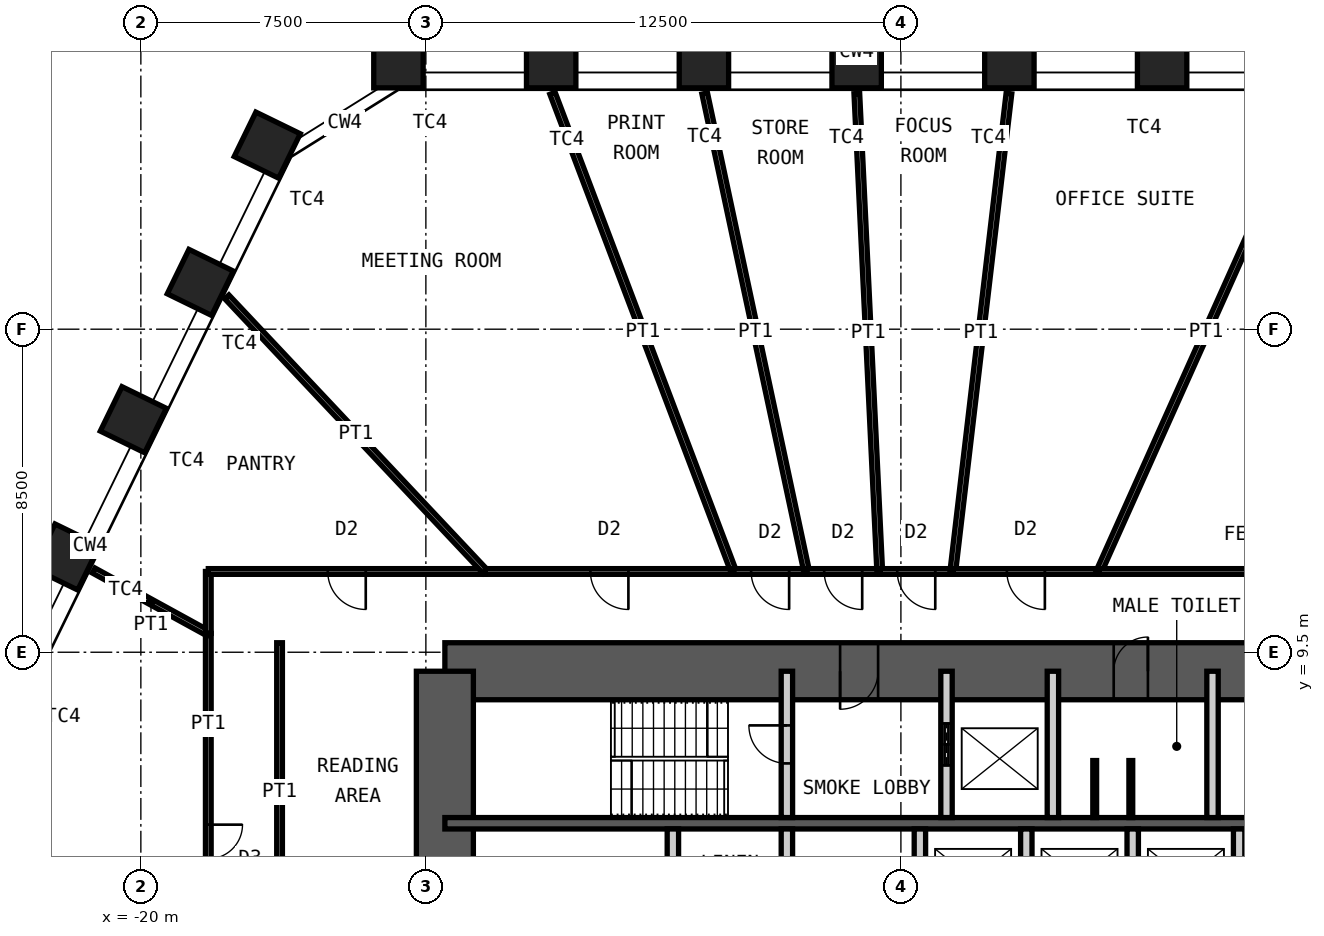
"""IFC4 building model, lengths in metres.
Left out: names, types, materials, properties, quantities, classifications, styles, units other than length and angle.
Written with IfcOpenShell. Run it as: python <this file> out.ifc"""

import sys

from ifc_helpers import new_model, si_unit, direction, frame, frame_2d, origin, origin_2d, place, context, subcontext, project, spatial, rectangle, hollow_rectangle, extrude, element, fill, save


model = new_model("IFC4")
c1 = context("Model", 3, precision=1e-05, world=origin(), true_north=direction((0.0, 1.0)))
c2 = subcontext(c1, "Body", "Model", "MODEL_VIEW")
j1 = project(units=[si_unit("LENGTHUNIT", "METRE"), si_unit("PLANEANGLEUNIT", "RADIAN")], contexts=[c1])
p1 = place(None, origin())
s1 = spatial("IfcSite", under=j1, at=p1, CompositionType="ELEMENT")
p2 = place(p1, origin())
s2 = spatial("IfcBuilding", under=s1, at=p2, CompositionType="ELEMENT")
p3 = place(p2, frame((0.0, 0.0, 145.0)))
s3 = spatial("IfcBuildingStorey", under=s2, at=p3, CompositionType="ELEMENT", Elevation=145.0)
for number, where, z_axis, x_axis in (
    (1, (-13.222, 25.0, 0.0), (0.0, 0.0, 1.0), (-1.0, 0.0, 0.0)),
    (2, (-9.203, 25.0, 0.0), (0.0, 0.0, 1.0), (-1.0, 0.0, 0.0)),
    (3, (-5.184, 25.0, 0.0), (0.0, 0.0, 1.0), (-1.0, 0.0, 0.0)),
    (4, (-1.165, 25.0, 0.0), (0.0, 0.0, 1.0), (-1.0, 0.0, 0.0)),
    (5, (2.854, 25.0, 0.0), (0.0, 0.0, 1.0), (-1.0, 0.0, 0.0)),
    (6, (6.874, 25.0, 0.0), (0.0, 0.0, 1.0), (-1.0, 0.0, 0.0)),
    (7, (-21.959, 12.006, 0.0), (0.0, 0.0, 1.0), (-0.438, -0.899, 0.0)),
    (8, (-20.198, 15.618, 0.0), (0.0, 0.0, 1.0), (-0.438, -0.899, 0.0)),
    (9, (-18.436, 19.23, 0.0), (0.0, 0.0, 1.0), (-0.438, -0.899, 0.0)),
    (10, (-16.674, 22.843, 0.0), (0.0, 0.0, 1.0), (-0.438, -0.899, 0.0)),
):
    element("IfcColumn", number, at=place(p3, frame(where, z_axis=z_axis, x_axis=x_axis)), inside=s3, PredefinedType="COLUMN", context=c2, shape_type="SweptSolid", body=[
        extrude(hollow_rectangle(XDim=1.3, YDim=1.3, WallThickness=0.1, at=origin_2d()), origin(), (0.0, 0.0, 1.0), 4.2),
    ])
p4 = place(p3, frame((-12.0, 9.0, 0.0), z_axis=(0.0, 0.0, 1.0), x_axis=(1.0, 0.0, 0.0)))
e11 = element("IfcWall", 11, at=p4, inside=s3, PredefinedType="SHEAR", context=c2, shape_type="SweptSolid", body=[
    extrude(rectangle(XDim=24.0, YDim=1.5, at=frame_2d((12.0, 0.0))), origin(), (0.0, 0.0, 1.0), 4.2),
])
p5 = place(p4, frame((10.4, 0.0, 0.0)))
e12 = element("IfcOpeningElement", 12, at=p5, cuts=e11, PredefinedType="OPENING", context=c2, shape_type="SweptSolid", body=[
    extrude(rectangle(XDim=1.0, YDim=2.1, at=frame_2d((0.5, 1.05))), frame((0.0, 0.76, 0.0), z_axis=(0.0, -1.0, 0.0), x_axis=(1.0, 0.0, 0.0)), (0.0, 0.0, 1.0), 1.52),
])
p6 = place(p4, frame((17.6, 0.0, 0.0)))
e13 = element("IfcOpeningElement", 13, at=p6, cuts=e11, PredefinedType="OPENING", context=c2, shape_type="SweptSolid", body=[
    extrude(rectangle(XDim=0.9, YDim=2.1, at=frame_2d((0.45, 1.05))), frame((0.0, 0.76, 0.0), z_axis=(0.0, -1.0, 0.0), x_axis=(1.0, 0.0, 0.0)), (0.0, 0.0, 1.0), 1.52),
])
p7 = place(p4, frame((21.9, 0.0, 0.0)))
e14 = element("IfcOpeningElement", 14, at=p7, cuts=e11, PredefinedType="OPENING", context=c2, shape_type="SweptSolid", body=[
    extrude(rectangle(XDim=0.9, YDim=2.1, at=frame_2d((0.45, 1.05))), frame((0.0, 0.76, 0.0), z_axis=(0.0, -1.0, 0.0), x_axis=(1.0, 0.0, 0.0)), (0.0, 0.0, 1.0), 1.52),
])
p8 = place(p3, frame((-12.0, -9.0, 0.0), z_axis=(0.0, 0.0, 1.0), x_axis=(0.0, 1.0, 0.0)))
e15 = element("IfcWall", 15, at=p8, inside=s3, PredefinedType="SHEAR", context=c2, shape_type="SweptSolid", body=[
    extrude(rectangle(XDim=18.0, YDim=1.5, at=frame_2d((9.0, 0.0))), origin(), (0.0, 0.0, 1.0), 4.2),
])
p9 = place(p8, frame((8.1, 0.0, 0.0)))
e16 = element("IfcOpeningElement", 16, at=p9, cuts=e15, PredefinedType="OPENING", context=c2, shape_type="SweptSolid", body=[
    extrude(rectangle(XDim=1.8, YDim=2.1, at=frame_2d((0.9, 1.05))), frame((0.0, 0.76, 0.0), z_axis=(0.0, -1.0, 0.0), x_axis=(1.0, 0.0, 0.0)), (0.0, 0.0, 1.0), 1.52),
])
p10 = place(p3, frame((-12.0, 5.0, 0.0), z_axis=(0.0, 0.0, 1.0), x_axis=(1.0, 0.0, 0.0)))
e17 = element("IfcWall", 17, at=p10, inside=s3, PredefinedType="SHEAR", context=c2, shape_type="SweptSolid", body=[
    extrude(rectangle(XDim=24.0, YDim=0.3, at=frame_2d((12.0, 0.0))), origin(), (0.0, 0.0, 1.0), 4.2),
])
p11 = place(p3, frame((-3.0, 5.15, 0.0), z_axis=(0.0, 0.0, 1.0), x_axis=(0.0, 1.0, 0.0)))
e18 = element("IfcWall", 18, at=p11, inside=s3, PredefinedType="PARTITIONING", context=c2, shape_type="SweptSolid", body=[
    extrude(rectangle(XDim=3.85, YDim=0.3, at=frame_2d((1.925, 0.0))), origin(), (0.0, 0.0, 1.0), 3.98),
])
p12 = place(p11, frame((1.425, 0.0, 0.0)))
e19 = element("IfcOpeningElement", 19, at=p12, cuts=e18, PredefinedType="OPENING", context=c2, shape_type="SweptSolid", body=[
    extrude(rectangle(XDim=1.0, YDim=2.1, at=frame_2d((0.5, 1.05))), frame((0.0, 0.16, 0.0), z_axis=(0.0, -1.0, 0.0), x_axis=(1.0, 0.0, 0.0)), (0.0, 0.0, 1.0), 0.32),
])
p13 = place(p3, frame((1.2, 5.15, 0.0), z_axis=(0.0, 0.0, 1.0), x_axis=(0.0, 1.0, 0.0)))
e20 = element("IfcWall", 20, at=p13, inside=s3, PredefinedType="PARTITIONING", context=c2, shape_type="SweptSolid", body=[
    extrude(rectangle(XDim=3.85, YDim=0.3, at=frame_2d((1.925, 0.0))), origin(), (0.0, 0.0, 1.0), 3.98),
])
p14 = place(p13, frame((1.375, 0.0, 0.0)))
e21 = element("IfcOpeningElement", 21, at=p14, cuts=e20, PredefinedType="OPENING", context=c2, shape_type="SweptSolid", body=[
    extrude(rectangle(XDim=1.1, YDim=2.4, at=frame_2d((0.55, 1.2))), frame((0.0, 0.16, 0.0), z_axis=(0.0, -1.0, 0.0), x_axis=(1.0, 0.0, 0.0)), (0.0, 0.0, 1.0), 0.32),
])
for number, where, z_axis, x_axis in (
    (22, (4.0, 5.15, 0.0), (0.0, 0.0, 1.0), (0.0, 1.0, 0.0)),
    (23, (8.2, 5.15, 0.0), (0.0, 0.0, 1.0), (0.0, 1.0, 0.0)),
):
    element("IfcWall", number, at=place(p3, frame(where, z_axis=z_axis, x_axis=x_axis)), inside=s3, PredefinedType="PARTITIONING", context=c2, shape_type="SweptSolid", body=[
        extrude(rectangle(XDim=3.85, YDim=0.3, at=frame_2d((1.925, 0.0))), origin(), (0.0, 0.0, 1.0), 3.98),
    ])
for number, where, z_axis, x_axis in (
    (24, (-6.0, 2.2, 0.0), (0.0, 0.0, 1.0), (0.0, 1.0, 0.0)),
    (25, (-3.0, 2.2, 0.0), (0.0, 0.0, 1.0), (0.0, 1.0, 0.0)),
    (26, (0.5, 2.2, 0.0), (0.0, 0.0, 1.0), (0.0, 1.0, 0.0)),
    (27, (3.3, 2.2, 0.0), (0.0, 0.0, 1.0), (0.0, 1.0, 0.0)),
    (28, (6.1, 2.2, 0.0), (0.0, 0.0, 1.0), (0.0, 1.0, 0.0)),
    (29, (8.9, 2.2, 0.0), (0.0, 0.0, 1.0), (0.0, 1.0, 0.0)),
):
    element("IfcWall", number, at=place(p3, frame(where, z_axis=z_axis, x_axis=x_axis)), inside=s3, PredefinedType="PARTITIONING", context=c2, shape_type="SweptSolid", body=[
        extrude(rectangle(XDim=2.65, YDim=0.3, at=frame_2d((1.325, 0.0))), origin(), (0.0, 0.0, 1.0), 3.98),
    ])
for number, where, z_axis, x_axis in (
    (30, (5.1, 5.15, 0.0), (0.0, 0.0, 1.0), (0.0, 1.0, 0.0)),
    (31, (6.05, 5.15, 0.0), (0.0, 0.0, 1.0), (0.0, 1.0, 0.0)),
):
    element("IfcWall", number, at=place(p3, frame(where, z_axis=z_axis, x_axis=x_axis)), inside=s3, PredefinedType="PARTITIONING", context=c2, shape_type="SweptSolid", body=[
        extrude(rectangle(XDim=1.5, YDim=0.1, at=frame_2d((0.75, 0.0))), origin(), (0.0, 0.0, 1.0), 2.1),
    ])
p15 = place(p3, frame((-18.225, -1.869, 0.0), z_axis=(0.0, 0.0, 1.0), x_axis=(0.0, 1.0, 0.0)))
e32 = element("IfcWall", 32, at=p15, inside=s3, PredefinedType="PARTITIONING", context=c2, shape_type="SweptSolid", body=[
    extrude(rectangle(XDim=11.865, YDim=0.15, at=frame_2d((5.932, 0.0))), origin(), (0.0, 0.0, 1.0), 4.03),
])
p16 = place(p15, frame((5.032, 0.0, 0.0)))
e33 = element("IfcOpeningElement", 33, at=p16, cuts=e32, PredefinedType="OPENING", context=c2, shape_type="SweptSolid", body=[
    extrude(rectangle(XDim=1.8, YDim=2.4, at=frame_2d((0.9, 1.2))), frame((0.0, 0.085, 0.0), z_axis=(0.0, -1.0, 0.0), x_axis=(1.0, 0.0, 0.0)), (0.0, 0.0, 1.0), 0.17),
])
p17 = place(p3, frame((-21.242, 11.651, 0.0), z_axis=(0.0, 0.0, 1.0), x_axis=(0.876768023831, -0.480913539409, 0.0)))
e34 = element("IfcWall", 34, at=p17, inside=s3, PredefinedType="PARTITIONING", context=c2, shape_type="SweptSolid", body=[
    extrude(rectangle(XDim=3.441, YDim=0.15, at=frame_2d((1.721, 0.0))), origin(), (0.0, 0.0, 1.0), 3.33),
])
p18 = place(p3, frame((-18.225, 9.996, 0.0), z_axis=(0.0, 0.0, 1.0), x_axis=(0.0, 1.0, 0.0)))
e35 = element("IfcWall", 35, at=p18, inside=s3, PredefinedType="PARTITIONING", context=c2, shape_type="SweptSolid", body=[
    extrude(rectangle(XDim=1.629, YDim=0.15, at=frame_2d((0.814, 0.0))), origin(), (0.0, 0.0, 1.0), 4.03),
])
p19 = place(p3, frame((-18.225, 11.625, 0.0), z_axis=(0.0, 0.0, 1.0), x_axis=(1.0, 0.0, 0.0)))
e36 = element("IfcWall", 36, at=p19, inside=s3, PredefinedType="PARTITIONING", context=c2, shape_type="SweptSolid", body=[
    extrude(rectangle(XDim=7.286, YDim=0.15, at=frame_2d((3.643, 0.0))), origin(), (0.0, 0.0, 1.0), 4.03),
])
p20 = place(p19, frame((3.143, 0.0, 0.0)))
e37 = element("IfcOpeningElement", 37, at=p20, cuts=e36, PredefinedType="OPENING", context=c2, shape_type="SweptSolid", body=[
    extrude(rectangle(XDim=1.0, YDim=2.4, at=frame_2d((0.5, 1.2))), frame((0.0, 0.085, 0.0), z_axis=(0.0, -1.0, 0.0), x_axis=(1.0, 0.0, 0.0)), (0.0, 0.0, 1.0), 0.17),
])
p21 = place(p3, frame((-17.738, 18.851, 0.0), z_axis=(0.0, 0.0, 1.0), x_axis=(0.685286406267, -0.728273672039, 0.0)))
e38 = element("IfcWall", 38, at=p21, inside=s3, PredefinedType="PARTITIONING", context=c2, shape_type="SweptSolid", body=[
    extrude(rectangle(XDim=9.922, YDim=0.15, at=frame_2d((4.961, 0.0))), origin(), (0.0, 0.0, 1.0), 3.33),
])
p22 = place(p3, frame((-10.939, 11.625, 0.0), z_axis=(0.0, 0.0, 1.0), x_axis=(1.0, 0.0, 0.0)))
e39 = element("IfcWall", 39, at=p22, inside=s3, PredefinedType="PARTITIONING", context=c2, shape_type="SweptSolid", body=[
    extrude(rectangle(XDim=6.536, YDim=0.15, at=frame_2d((3.268, 0.0))), origin(), (0.0, 0.0, 1.0), 4.03),
])
p23 = place(p22, frame((2.768, 0.0, 0.0)))
e40 = element("IfcOpeningElement", 40, at=p23, cuts=e39, PredefinedType="OPENING", context=c2, shape_type="SweptSolid", body=[
    extrude(rectangle(XDim=1.0, YDim=2.4, at=frame_2d((0.5, 1.2))), frame((0.0, 0.085, 0.0), z_axis=(0.0, -1.0, 0.0), x_axis=(1.0, 0.0, 0.0)), (0.0, 0.0, 1.0), 0.17),
])
p24 = place(p3, frame((-9.167, 24.207, 0.0), z_axis=(0.0, 0.0, 1.0), x_axis=(0.354156368181, -0.935186220427, 0.0)))
e41 = element("IfcWall", 41, at=p24, inside=s3, PredefinedType="PARTITIONING", context=c2, shape_type="SweptSolid", body=[
    extrude(rectangle(XDim=13.454, YDim=0.15, at=frame_2d((6.727, 0.0))), origin(), (0.0, 0.0, 1.0), 3.33),
])
p25 = place(p3, frame((-4.403, 11.625, 0.0), z_axis=(0.0, 0.0, 1.0), x_axis=(1.0, 0.0, 0.0)))
e42 = element("IfcWall", 42, at=p25, inside=s3, PredefinedType="PARTITIONING", context=c2, shape_type="SweptSolid", body=[
    extrude(rectangle(XDim=1.923, YDim=0.15, at=frame_2d((0.961, 0.0))), origin(), (0.0, 0.0, 1.0), 4.03),
])
p26 = place(p25, frame((0.461, 0.0, 0.0)))
e43 = element("IfcOpeningElement", 43, at=p26, cuts=e42, PredefinedType="OPENING", context=c2, shape_type="SweptSolid", body=[
    extrude(rectangle(XDim=1.0, YDim=2.4, at=frame_2d((0.5, 1.2))), frame((0.0, 0.085, 0.0), z_axis=(0.0, -1.0, 0.0), x_axis=(1.0, 0.0, 0.0)), (0.0, 0.0, 1.0), 0.17),
])
p27 = place(p3, frame((-5.163, 24.202, 0.0), z_axis=(0.0, 0.0, 1.0), x_axis=(0.208618861146, -0.977997019819, 0.0)))
e44 = element("IfcWall", 44, at=p27, inside=s3, PredefinedType="PARTITIONING", context=c2, shape_type="SweptSolid", body=[
    extrude(rectangle(XDim=12.86, YDim=0.15, at=frame_2d((6.43, 0.0))), origin(), (0.0, 0.0, 1.0), 3.33),
])
p28 = place(p3, frame((-2.48, 11.625, 0.0), z_axis=(0.0, 0.0, 1.0), x_axis=(1.0, 0.0, 0.0)))
e45 = element("IfcWall", 45, at=p28, inside=s3, PredefinedType="PARTITIONING", context=c2, shape_type="SweptSolid", body=[
    extrude(rectangle(XDim=1.923, YDim=0.15, at=frame_2d((0.961, 0.0))), origin(), (0.0, 0.0, 1.0), 4.03),
])
p29 = place(p28, frame((0.461, 0.0, 0.0)))
e46 = element("IfcOpeningElement", 46, at=p29, cuts=e45, PredefinedType="OPENING", context=c2, shape_type="SweptSolid", body=[
    extrude(rectangle(XDim=1.0, YDim=2.4, at=frame_2d((0.5, 1.2))), frame((0.0, 0.085, 0.0), z_axis=(0.0, -1.0, 0.0), x_axis=(1.0, 0.0, 0.0)), (0.0, 0.0, 1.0), 0.17),
])
p30 = place(p3, frame((-1.16, 24.2, 0.0), z_axis=(0.0, 0.0, 1.0), x_axis=(0.047859979164, -0.998854054602, 0.0)))
e47 = element("IfcWall", 47, at=p30, inside=s3, PredefinedType="PARTITIONING", context=c2, shape_type="SweptSolid", body=[
    extrude(rectangle(XDim=12.59, YDim=0.15, at=frame_2d((6.295, 0.0))), origin(), (0.0, 0.0, 1.0), 3.33),
])
p31 = place(p3, frame((-0.557, 11.625, 0.0), z_axis=(0.0, 0.0, 1.0), x_axis=(1.0, 0.0, 0.0)))
e48 = element("IfcWall", 48, at=p31, inside=s3, PredefinedType="PARTITIONING", context=c2, shape_type="SweptSolid", body=[
    extrude(rectangle(XDim=1.923, YDim=0.15, at=frame_2d((0.961, 0.0))), origin(), (0.0, 0.0, 1.0), 4.03),
])
p32 = place(p31, frame((0.461, 0.0, 0.0)))
e49 = element("IfcOpeningElement", 49, at=p32, cuts=e48, PredefinedType="OPENING", context=c2, shape_type="SweptSolid", body=[
    extrude(rectangle(XDim=1.0, YDim=2.4, at=frame_2d((0.5, 1.2))), frame((0.0, 0.085, 0.0), z_axis=(0.0, -1.0, 0.0), x_axis=(1.0, 0.0, 0.0)), (0.0, 0.0, 1.0), 0.17),
])
p33 = place(p3, frame((2.843, 24.201, 0.0), z_axis=(0.0, 0.0, 1.0), x_axis=(-0.116670084723, -0.993170726175, 0.0)))
e50 = element("IfcWall", 50, at=p33, inside=s3, PredefinedType="PARTITIONING", context=c2, shape_type="SweptSolid", body=[
    extrude(rectangle(XDim=12.662, YDim=0.15, at=frame_2d((6.331, 0.0))), origin(), (0.0, 0.0, 1.0), 3.33),
])
p34 = place(p3, frame((1.366, 11.625, 0.0), z_axis=(0.0, 0.0, 1.0), x_axis=(1.0, 0.0, 0.0)))
e51 = element("IfcWall", 51, at=p34, inside=s3, PredefinedType="PARTITIONING", context=c2, shape_type="SweptSolid", body=[
    extrude(rectangle(XDim=3.845, YDim=0.15, at=frame_2d((1.923, 0.0))), origin(), (0.0, 0.0, 1.0), 4.03),
])
p35 = place(p34, frame((1.423, 0.0, 0.0)))
e52 = element("IfcOpeningElement", 52, at=p35, cuts=e51, PredefinedType="OPENING", context=c2, shape_type="SweptSolid", body=[
    extrude(rectangle(XDim=1.0, YDim=2.4, at=frame_2d((0.5, 1.2))), frame((0.0, 0.085, 0.0), z_axis=(0.0, -1.0, 0.0), x_axis=(1.0, 0.0, 0.0)), (0.0, 0.0, 1.0), 0.17),
])
p36 = place(p3, frame((10.852, 24.209, 0.0), z_axis=(0.0, 0.0, 1.0), x_axis=(-0.40904878746, -0.912512514696, 0.0)))
e53 = element("IfcWall", 53, at=p36, inside=s3, PredefinedType="PARTITIONING", context=c2, shape_type="SweptSolid", body=[
    extrude(rectangle(XDim=13.79, YDim=0.15, at=frame_2d((6.895, 0.0))), origin(), (0.0, 0.0, 1.0), 2.93),
])
p37 = place(p3, frame((5.211, 11.625, 0.0), z_axis=(0.0, 0.0, 1.0), x_axis=(1.0, 0.0, 0.0)))
e54 = element("IfcWall", 54, at=p37, inside=s3, PredefinedType="PARTITIONING", context=c2, shape_type="SweptSolid", body=[
    extrude(rectangle(XDim=12.414, YDim=0.15, at=frame_2d((6.207, 0.0))), origin(), (0.0, 0.0, 1.0), 4.03),
])
p38 = place(p37, frame((5.307, 0.0, 0.0)))
e55 = element("IfcOpeningElement", 55, at=p38, cuts=e54, PredefinedType="OPENING", context=c2, shape_type="SweptSolid", body=[
    extrude(rectangle(XDim=1.8, YDim=2.4, at=frame_2d((0.9, 1.2))), frame((0.0, 0.085, 0.0), z_axis=(0.0, -1.0, 0.0), x_axis=(1.0, 0.0, 0.0)), (0.0, 0.0, 1.0), 0.17),
])
p39 = place(p3, frame((-16.35, 1.9, 0.0), z_axis=(0.0, 0.0, 1.0), x_axis=(0.0, 1.0, 0.0)))
e56 = element("IfcWall", 56, at=p39, inside=s3, PredefinedType="PARTITIONING", context=c2, shape_type="SweptSolid", body=[
    extrude(rectangle(XDim=7.85, YDim=0.15, at=frame_2d((3.925, 0.0))), origin(), (0.0, 0.0, 1.0), 4.03),
])
p40 = place(p5, origin())
e57 = element("IfcDoor", 57, at=p40, inside=s3, OperationType="SINGLE_SWING_LEFT", PredefinedType="DOOR", context=c2, shape_type="SweptSolid", body=[
    extrude(rectangle(XDim=1.0, YDim=2.1, at=frame_2d((0.5, 1.05))), frame((0.0, 0.025, 0.0), z_axis=(0.0, -1.0, 0.0), x_axis=(1.0, 0.0, 0.0)), (0.0, 0.0, 1.0), 0.05),
])
fill(e12, e57)
p41 = place(p6, origin())
e58 = element("IfcDoor", 58, at=p41, inside=s3, OperationType="SINGLE_SWING_LEFT", PredefinedType="DOOR", context=c2, shape_type="SweptSolid", body=[
    extrude(rectangle(XDim=0.9, YDim=2.1, at=frame_2d((0.45, 1.05))), frame((0.0, 0.025, 0.0), z_axis=(0.0, -1.0, 0.0), x_axis=(1.0, 0.0, 0.0)), (0.0, 0.0, 1.0), 0.05),
])
fill(e13, e58)
p42 = place(p12, origin())
e59 = element("IfcDoor", 59, at=p42, inside=s3, OperationType="SINGLE_SWING_LEFT", PredefinedType="DOOR", context=c2, shape_type="SweptSolid", body=[
    extrude(rectangle(XDim=1.0, YDim=2.1, at=frame_2d((0.5, 1.05))), frame((0.0, 0.025, 0.0), z_axis=(0.0, -1.0, 0.0), x_axis=(1.0, 0.0, 0.0)), (0.0, 0.0, 1.0), 0.05),
])
fill(e19, e59)
p43 = place(p14, origin())
e60 = element("IfcDoor", 60, at=p43, inside=s3, OperationType="DOUBLE_DOOR_SLIDING", PredefinedType="DOOR", context=c2, shape_type="SweptSolid", body=[
    extrude(rectangle(XDim=1.1, YDim=2.4, at=frame_2d((0.55, 1.2))), frame((0.0, 0.025, 0.0), z_axis=(0.0, -1.0, 0.0), x_axis=(1.0, 0.0, 0.0)), (0.0, 0.0, 1.0), 0.05),
])
fill(e21, e60)
p44 = place(p16, origin())
e61 = element("IfcDoor", 61, at=p44, inside=s3, OperationType="DOUBLE_DOOR_DOUBLE_SWING", PredefinedType="DOOR", context=c2, shape_type="SweptSolid", body=[
    extrude(rectangle(XDim=1.8, YDim=2.4, at=frame_2d((0.9, 1.2))), frame((0.0, 0.025, 0.0), z_axis=(0.0, -1.0, 0.0), x_axis=(1.0, 0.0, 0.0)), (0.0, 0.0, 1.0), 0.05),
])
fill(e33, e61)
p45 = place(p20, origin())
e62 = element("IfcDoor", 62, at=p45, inside=s3, OperationType="SINGLE_SWING_RIGHT", PredefinedType="DOOR", context=c2, shape_type="SweptSolid", body=[
    extrude(rectangle(XDim=1.0, YDim=2.4, at=frame_2d((0.5, 1.2))), frame((0.0, 0.025, 0.0), z_axis=(0.0, -1.0, 0.0), x_axis=(1.0, 0.0, 0.0)), (0.0, 0.0, 1.0), 0.05),
])
fill(e37, e62)
p46 = place(p23, origin())
e63 = element("IfcDoor", 63, at=p46, inside=s3, OperationType="SINGLE_SWING_RIGHT", PredefinedType="DOOR", context=c2, shape_type="SweptSolid", body=[
    extrude(rectangle(XDim=1.0, YDim=2.4, at=frame_2d((0.5, 1.2))), frame((0.0, 0.025, 0.0), z_axis=(0.0, -1.0, 0.0), x_axis=(1.0, 0.0, 0.0)), (0.0, 0.0, 1.0), 0.05),
])
fill(e40, e63)
p47 = place(p26, origin())
e64 = element("IfcDoor", 64, at=p47, inside=s3, OperationType="SINGLE_SWING_RIGHT", PredefinedType="DOOR", context=c2, shape_type="SweptSolid", body=[
    extrude(rectangle(XDim=1.0, YDim=2.4, at=frame_2d((0.5, 1.2))), frame((0.0, 0.025, 0.0), z_axis=(0.0, -1.0, 0.0), x_axis=(1.0, 0.0, 0.0)), (0.0, 0.0, 1.0), 0.05),
])
fill(e43, e64)
p48 = place(p29, origin())
e65 = element("IfcDoor", 65, at=p48, inside=s3, OperationType="SINGLE_SWING_RIGHT", PredefinedType="DOOR", context=c2, shape_type="SweptSolid", body=[
    extrude(rectangle(XDim=1.0, YDim=2.4, at=frame_2d((0.5, 1.2))), frame((0.0, 0.025, 0.0), z_axis=(0.0, -1.0, 0.0), x_axis=(1.0, 0.0, 0.0)), (0.0, 0.0, 1.0), 0.05),
])
fill(e46, e65)
p49 = place(p32, origin())
e66 = element("IfcDoor", 66, at=p49, inside=s3, OperationType="SINGLE_SWING_RIGHT", PredefinedType="DOOR", context=c2, shape_type="SweptSolid", body=[
    extrude(rectangle(XDim=1.0, YDim=2.4, at=frame_2d((0.5, 1.2))), frame((0.0, 0.025, 0.0), z_axis=(0.0, -1.0, 0.0), x_axis=(1.0, 0.0, 0.0)), (0.0, 0.0, 1.0), 0.05),
])
fill(e49, e66)
p50 = place(p35, origin())
e67 = element("IfcDoor", 67, at=p50, inside=s3, OperationType="SINGLE_SWING_RIGHT", PredefinedType="DOOR", context=c2, shape_type="SweptSolid", body=[
    extrude(rectangle(XDim=1.0, YDim=2.4, at=frame_2d((0.5, 1.2))), frame((0.0, 0.025, 0.0), z_axis=(0.0, -1.0, 0.0), x_axis=(1.0, 0.0, 0.0)), (0.0, 0.0, 1.0), 0.05),
])
fill(e52, e67)
save(model, sys.argv[1])
